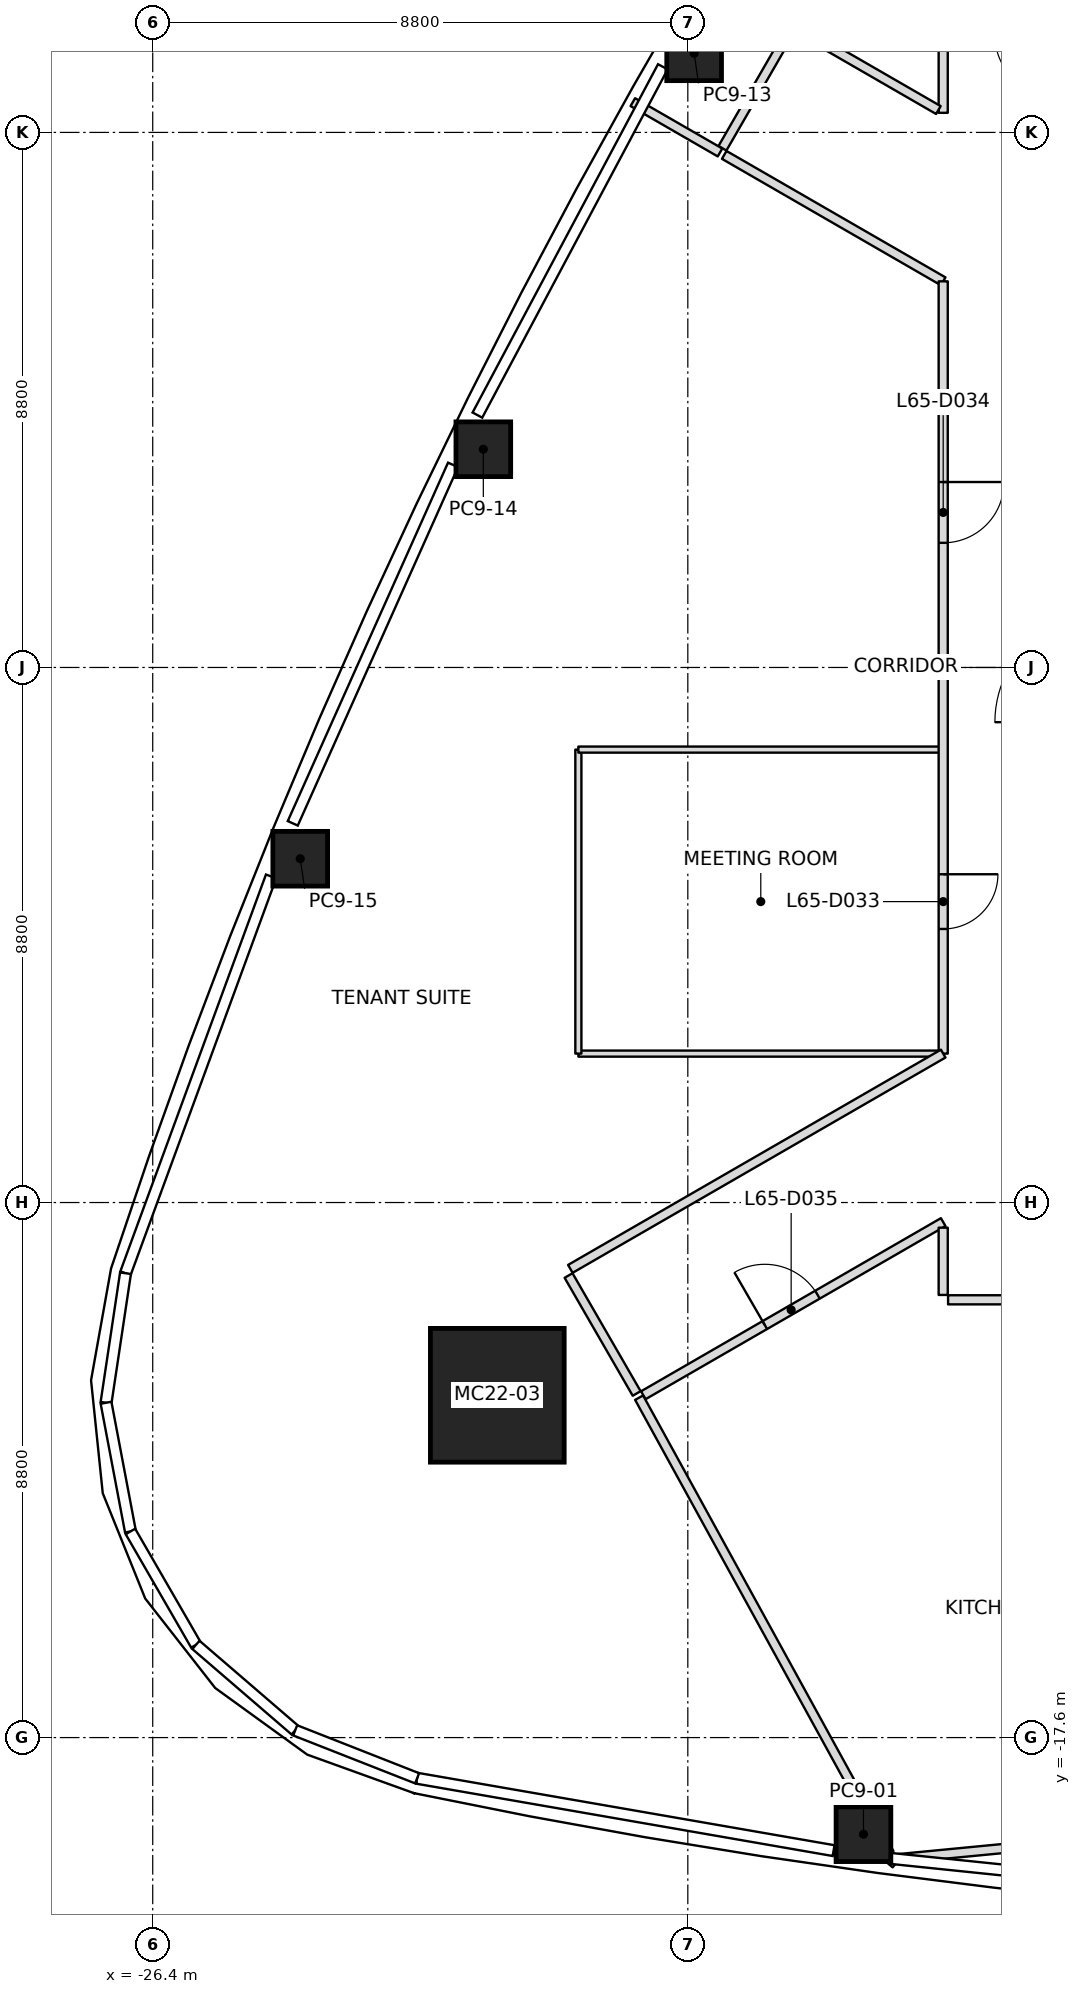
"""IFC4 building model, lengths in metres.
Left out: names, types, materials, properties, quantities, classifications, styles, units other than length and angle.
Written with IfcOpenShell. Run it as: python <this file> out.ifc"""

import sys

from ifc_helpers import new_model, si_unit, direction, frame, frame_2d, origin, origin_2d, place, context, subcontext, project, spatial, rectangle, extrude, element, fill, save


model = new_model("IFC4")
c1 = context("Model", 3, precision=1e-05, world=origin(), true_north=direction((0.0, 1.0)))
c2 = subcontext(c1, "Body", "Model", "MODEL_VIEW")
j1 = project(units=[si_unit("LENGTHUNIT", "METRE"), si_unit("PLANEANGLEUNIT", "RADIAN")], contexts=[c1])
p1 = place(None, origin())
s1 = spatial("IfcSite", under=j1, at=p1, CompositionType="ELEMENT")
p2 = place(p1, origin())
s2 = spatial("IfcBuilding", under=s1, at=p2, CompositionType="ELEMENT")
p3 = place(p2, frame((0.0, 0.0, 287.0)))
s3 = spatial("IfcBuildingStorey", under=s2, at=p3, CompositionType="ELEMENT", Elevation=287.0)
p4 = place(p3, frame((-20.733, -11.97, 0.0), z_axis=(0.027756747396, 0.015983006193, 0.999486921619), x_axis=(0.999614707262, -0.000443807261, -0.027753199115)))
e1 = element("IfcColumn", 1, at=p4, inside=s3, PredefinedType="COLUMN", context=c2, shape_type="SweptSolid", body=[
    extrude(rectangle(XDim=2.2, YDim=2.2, at=origin_2d()), origin(), (0.0, 0.0, 1.0), 4.002),
])
p5 = place(p3, frame((-14.711, -19.189, 0.0), z_axis=(0.017452456582, 0.010373837829, 0.999793876381), x_axis=(-0.990401248392, 0.137308803417, 0.015863785428)))
e2 = element("IfcColumn", 2, at=p5, inside=s3, PredefinedType="COLUMN", context=c2, shape_type="SweptSolid", body=[
    extrude(rectangle(XDim=0.9, YDim=0.9, at=origin_2d()), origin(), (0.0, 0.0, 1.0), 4.001),
])
p6 = place(p3, frame((-17.496, 10.101, 0.0), z_axis=(0.009887052741, -0.005675900648, 0.999935013058), x_axis=(0.49997556095, 0.866039512773, -2.7732311e-05)))
e3 = element("IfcColumn", 3, at=p6, inside=s3, PredefinedType="COLUMN", context=c2, shape_type="SweptSolid", body=[
    extrude(rectangle(XDim=0.9, YDim=0.9, at=origin_2d()), origin(), (0.0, 0.0, 1.0), 4.0),
])
p7 = place(p3, frame((-20.963, 3.589, 0.0), z_axis=(0.014036676147, 0.001952928855, 0.999899573853), x_axis=(0.439251595424, 0.898329169532, -0.007920800804)))
e4 = element("IfcColumn", 4, at=p7, inside=s3, PredefinedType="COLUMN", context=c2, shape_type="SweptSolid", body=[
    extrude(rectangle(XDim=0.9, YDim=0.9, at=origin_2d()), origin(), (0.0, 0.0, 1.0), 4.0),
])
p8 = place(p3, frame((-23.974, -3.146, 0.0), z_axis=(0.017696558482, 0.009885663704, 0.999794531627), x_axis=(0.376453127918, 0.926300544212, -0.015822271439)))
e5 = element("IfcColumn", 5, at=p8, inside=s3, PredefinedType="COLUMN", context=c2, shape_type="SweptSolid", body=[
    extrude(rectangle(XDim=0.9, YDim=0.9, at=origin_2d()), origin(), (0.0, 0.0, 1.0), 4.001),
])
p9 = place(p3, frame((-18.401, -12.01, 0.0), z_axis=(0.0, 0.0, 1.0), x_axis=(0.481538391905, -0.876424998002, 0.0)))
e6 = element("IfcWall", 6, at=p9, inside=s3, PredefinedType="PARTITIONING", context=c2, shape_type="SweptSolid", body=[
    extrude(rectangle(XDim=8.551, YDim=0.15, at=frame_2d((4.275, 0.0))), origin(), (0.0, 0.0, 1.0), 3.3),
])
p10 = place(p3, frame((-17.071, 8.47, 0.0), z_axis=(0.0, 0.0, 1.0), x_axis=(-0.866011236992, 0.500024536802, 0.0)))
e7 = element("IfcWall", 7, at=p10, inside=s3, PredefinedType="PARTITIONING", context=c2, shape_type="SweptSolid", body=[
    extrude(rectangle(XDim=1.656, YDim=0.15, at=frame_2d((0.828, 0.0))), origin(), (0.0, 0.0, 1.0), 3.234),
])
p11 = place(p3, frame((-8.2, -19.019, 0.0), z_axis=(0.0, 0.0, 1.0), x_axis=(-0.995385286617, -0.09595900784, 0.0)))
e8 = element("IfcWall", 8, at=p11, inside=s3, PredefinedType="PARTITIONING", context=c2, shape_type="SweptSolid", body=[
    extrude(rectangle(XDim=5.961, YDim=0.15, at=frame_2d((2.98, 0.0))), origin(), (0.0, 0.0, 1.0), 3.234),
])
p12 = place(p3, frame((-14.184, -19.677, 0.0), z_axis=(0.0, 0.0, 1.0), x_axis=(-0.763090850206, 0.646291230276, 0.0)))
e9 = element("IfcWall", 9, at=p12, inside=s3, PredefinedType="PARTITIONING", context=c2, shape_type="SweptSolid", body=[
    extrude(rectangle(XDim=0.188, YDim=0.15, at=frame_2d((0.094, 0.0))), origin(), (0.0, 0.0, 1.0), 3.3),
])
p13 = place(p3, frame((-19.561, -10.0, 0.0), z_axis=(0.0, 0.0, 1.0), x_axis=(0.500077830873, -0.865980463445, 0.0)))
e10 = element("IfcWall", 10, at=p13, inside=s3, PredefinedType="PARTITIONING", context=c2, shape_type="SweptSolid", body=[
    extrude(rectangle(XDim=2.24, YDim=0.15, at=frame_2d((1.12, 0.0))), origin(), (0.0, 0.0, 1.0), 3.233),
])
p14 = place(p3, frame((-17.001, 8.43, 0.0), z_axis=(0.0, 0.0, 1.0), x_axis=(0.866037957609, -0.499978255508, 0.0)))
e11 = element("IfcWall", 11, at=p14, inside=s3, PredefinedType="PARTITIONING", context=c2, shape_type="SweptSolid", body=[
    extrude(rectangle(XDim=4.158, YDim=0.15, at=frame_2d((2.079, 0.0))), origin(), (0.0, 0.0, 1.0), 3.3),
])
p15 = place(p3, frame((-13.4, 6.351, 0.0), z_axis=(0.0, 0.0, 1.0), x_axis=(0.0, -1.0, 0.0)))
e12 = element("IfcWall", 12, at=p15, inside=s3, PredefinedType="PARTITIONING", context=c2, shape_type="SweptSolid", body=[
    extrude(rectangle(XDim=12.702, YDim=0.15, at=frame_2d((6.351, 0.0))), origin(), (0.0, 0.0, 1.0), 3.3),
])
p16 = place(p15, frame((9.752, 0.0, 0.0)))
e13 = element("IfcOpeningElement", 13, at=p16, cuts=e12, PredefinedType="OPENING", context=c2, shape_type="SweptSolid", body=[
    extrude(rectangle(XDim=0.9, YDim=2.1, at=frame_2d((0.45, 1.05))), frame((0.0, 0.075, 0.0), z_axis=(0.0, -1.0, 0.0), x_axis=(1.0, 0.0, 0.0)), (0.0, 0.0, 1.0), 0.15),
])
p17 = place(p15, frame((3.301, 0.0, 0.0)))
e14 = element("IfcOpeningElement", 14, at=p17, cuts=e12, PredefinedType="OPENING", context=c2, shape_type="SweptSolid", body=[
    extrude(rectangle(XDim=1.0, YDim=2.1, at=frame_2d((0.5, 1.05))), frame((0.0, 0.075, 0.0), z_axis=(0.0, -1.0, 0.0), x_axis=(1.0, 0.0, 0.0)), (0.0, 0.0, 1.0), 0.15),
])
p18 = place(p3, frame((-13.4, -6.351, 0.0), z_axis=(0.0, 0.0, 1.0), x_axis=(-0.86602998301, -0.499992068465, 0.0)))
e15 = element("IfcWall", 15, at=p18, inside=s3, PredefinedType="PARTITIONING", context=c2, shape_type="SweptSolid", body=[
    extrude(rectangle(XDim=7.081, YDim=0.15, at=frame_2d((3.54, 0.0))), origin(), (0.0, 0.0, 1.0), 3.3),
])
p19 = place(p3, frame((-18.332, -11.969, 0.0), z_axis=(0.0, 0.0, 1.0), x_axis=(0.866026383709, 0.499998302717, 0.0)))
e16 = element("IfcWall", 16, at=p19, inside=s3, PredefinedType="PARTITIONING", context=c2, shape_type="SweptSolid", body=[
    extrude(rectangle(XDim=5.695, YDim=0.15, at=frame_2d((2.847, 0.0))), origin(), (0.0, 0.0, 1.0), 3.233),
])
p20 = place(p19, frame((2.308, 0.0, 0.0)))
e17 = element("IfcOpeningElement", 17, at=p20, cuts=e16, PredefinedType="OPENING", context=c2, shape_type="SweptSolid", body=[
    extrude(rectangle(XDim=1.0, YDim=2.1, at=frame_2d((0.5, 1.05))), frame((0.0, 0.075, 0.0), z_axis=(0.0, -1.0, 0.0), x_axis=(1.0, 0.0, 0.0)), (0.0, 0.0, 1.0), 0.15),
])
p21 = place(p3, frame((-13.4, -9.214, 0.0), z_axis=(0.0, 0.0, 1.0), x_axis=(0.0, -1.0, 0.0)))
e18 = element("IfcWall", 18, at=p21, inside=s3, PredefinedType="PARTITIONING", context=c2, shape_type="SweptSolid", body=[
    extrude(rectangle(XDim=1.106, YDim=0.15, at=frame_2d((0.553, 0.0))), origin(), (0.0, 0.0, 1.0), 3.233),
])
p22 = place(p3, frame((-15.91, 10.479, 0.0), z_axis=(0.0, 0.0, 1.0), x_axis=(-0.500030632641, -0.866007717299, 0.0)))
e19 = element("IfcWall", 19, at=p22, inside=s3, PredefinedType="PARTITIONING", context=c2, shape_type="SweptSolid", body=[
    extrude(rectangle(XDim=2.24, YDim=0.15, at=frame_2d((1.12, 0.0))), origin(), (0.0, 0.0, 1.0), 3.3),
])
p23 = place(p3, frame((-13.4, 10.32, 0.0), z_axis=(0.0, 0.0, 1.0), x_axis=(0.0, -1.0, 0.0)))
e20 = element("IfcWall", 20, at=p23, inside=s3, PredefinedType="PARTITIONING", context=c2, shape_type="SweptSolid", body=[
    extrude(rectangle(XDim=1.198, YDim=0.15, at=frame_2d((0.599, 0.0))), origin(), (0.0, 0.0, 1.0), 3.3),
])
p24 = place(p3, frame((-13.479, 9.168, 0.0), z_axis=(0.0, 0.0, 1.0), x_axis=(-0.866032438121, 0.499987815973, 0.0)))
e21 = element("IfcWall", 21, at=p24, inside=s3, PredefinedType="PARTITIONING", context=c2, shape_type="SweptSolid", body=[
    extrude(rectangle(XDim=2.681, YDim=0.15, at=frame_2d((1.341, 0.0))), origin(), (0.0, 0.0, 1.0), 3.3),
])
p25 = place(p3, frame((-13.32, -10.4, 0.0), z_axis=(0.0, 0.0, 1.0), x_axis=(1.0, 0.0, 0.0)))
e22 = element("IfcWall", 22, at=p25, inside=s3, PredefinedType="PARTITIONING", context=c2, shape_type="SweptSolid", body=[
    extrude(rectangle(XDim=12.12, YDim=0.15, at=frame_2d((6.06, 0.0))), origin(), (0.0, 0.0, 1.0), 3.3),
])
p26 = place(p3, frame((-13.46, -6.351, 0.0), z_axis=(0.0, 0.0, 1.0), x_axis=(-1.0, 0.0, 0.0)))
e23 = element("IfcWall", 23, at=p26, inside=s3, PredefinedType="PARTITIONING", context=c2, shape_type="SweptSolid", body=[
    extrude(rectangle(XDim=5.94, YDim=0.1, at=frame_2d((2.97, 0.0))), origin(), (0.0, 0.0, 1.0), 3.3),
])
p27 = place(p3, frame((-19.4, -6.351, 0.0), z_axis=(0.0, 0.0, 1.0), x_axis=(0.0, 1.0, 0.0)))
e24 = element("IfcWall", 24, at=p27, inside=s3, PredefinedType="PARTITIONING", context=c2, shape_type="SweptSolid", body=[
    extrude(rectangle(XDim=5.0, YDim=0.1, at=frame_2d((2.5, 0.0))), origin(), (0.0, 0.0, 1.0), 3.3),
])
p28 = place(p3, frame((-19.4, -1.351, 0.0), z_axis=(0.0, 0.0, 1.0), x_axis=(1.0, 0.0, 0.0)))
e25 = element("IfcWall", 25, at=p28, inside=s3, PredefinedType="PARTITIONING", context=c2, shape_type="SweptSolid", body=[
    extrude(rectangle(XDim=5.97, YDim=0.1, at=frame_2d((2.985, 0.0))), origin(), (0.0, 0.0, 1.0), 3.3),
])
p29 = place(p16, origin())
e26 = element("IfcDoor", 26, at=p29, inside=s3, OperationType="SINGLE_SWING_LEFT", PredefinedType="DOOR", context=c2, shape_type="SweptSolid", body=[
    extrude(rectangle(XDim=0.9, YDim=2.1, at=frame_2d((0.45, 1.05))), frame((0.0, 0.025, 0.0), z_axis=(0.0, -1.0, 0.0), x_axis=(1.0, 0.0, 0.0)), (0.0, 0.0, 1.0), 0.05),
])
fill(e13, e26)
p30 = place(p17, origin())
e27 = element("IfcDoor", 27, at=p30, inside=s3, OperationType="SINGLE_SWING_LEFT", PredefinedType="DOOR", context=c2, shape_type="SweptSolid", body=[
    extrude(rectangle(XDim=1.0, YDim=2.1, at=frame_2d((0.5, 1.05))), frame((0.0, 0.025, 0.0), z_axis=(0.0, -1.0, 0.0), x_axis=(1.0, 0.0, 0.0)), (0.0, 0.0, 1.0), 0.05),
])
fill(e14, e27)
p31 = place(p20, origin())
e28 = element("IfcDoor", 28, at=p31, inside=s3, OperationType="SINGLE_SWING_LEFT", PredefinedType="DOOR", context=c2, shape_type="SweptSolid", body=[
    extrude(rectangle(XDim=1.0, YDim=2.1, at=frame_2d((0.5, 1.05))), frame((0.0, 0.025, 0.0), z_axis=(0.0, -1.0, 0.0), x_axis=(1.0, 0.0, 0.0)), (0.0, 0.0, 1.0), 0.05),
])
fill(e17, e28)
save(model, sys.argv[1])
